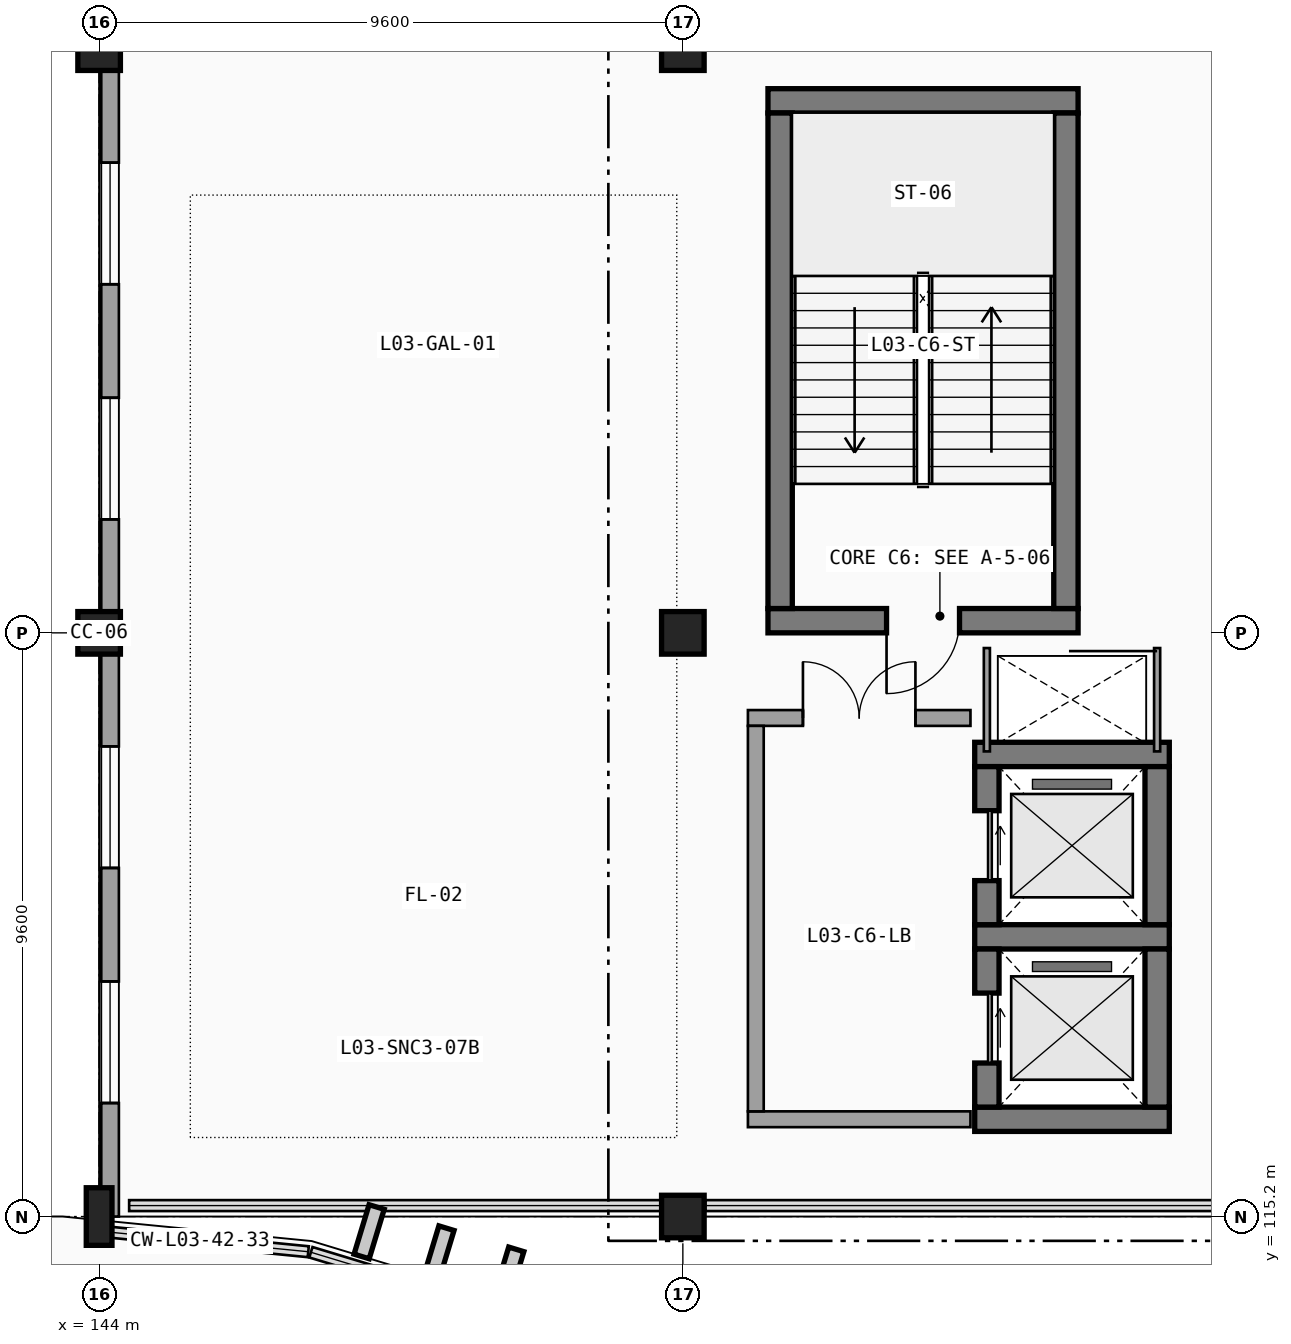
"""IFC4 building model, lengths in metres.
Left out: names, types, materials, properties, quantities, classifications, styles, units other than length and angle.
Written with IfcOpenShell. Run it as: python <this file> out.ifc"""

import sys

from ifc_helpers import new_model, si_unit, direction, frame, frame_2d, origin, origin_2d, place, context, subcontext, project, spatial, rectangle, i_section, extrude, element, fill, save


model = new_model("IFC4")
c1 = context("Model", 3, precision=1e-05, world=origin(), true_north=direction((0.0, 1.0)))
c2 = subcontext(c1, "Body", "Model", "MODEL_VIEW")
j1 = project(units=[si_unit("LENGTHUNIT", "METRE"), si_unit("PLANEANGLEUNIT", "RADIAN")], contexts=[c1])
p1 = place(None, origin())
s1 = spatial("IfcSite", under=j1, at=p1, CompositionType="ELEMENT")
p2 = place(p1, origin())
s2 = spatial("IfcBuilding", under=s1, at=p2, CompositionType="ELEMENT")
p3 = place(p2, frame((0.0, 0.0, 14.1)))
s3 = spatial("IfcBuildingStorey", under=s2, at=p3, CompositionType="ELEMENT", Elevation=14.1)
p4 = place(p3, frame((144.0, 115.2, 0.0), z_axis=(0.0, 0.0, 1.0), x_axis=(1.0, 0.0, 0.0)))
e1 = element("IfcColumn", 1, at=p4, inside=s3, PredefinedType="COLUMN", context=c2, shape_type="SweptSolid", body=[
    extrude(i_section(OverallWidth=0.423, OverallDepth=0.948, WebThickness=0.024, FlangeThickness=0.043, FilletRadius=0.024, at=origin_2d()), origin(), (0.0, 0.0, 1.0), 4.5),
])
for number, where, z_axis, x_axis in (
    (2, (144.0, 124.8, 0.0), (0.0, 0.0, 1.0), (1.0, 0.0, 0.0)),
    (3, (144.0, 134.4, 0.0), (0.0, 0.0, 1.0), (1.0, 0.0, 0.0)),
    (4, (153.6, 115.2, 0.0), (0.0, 0.0, 1.0), (1.0, 0.0, 0.0)),
    (5, (153.6, 124.8, 0.0), (0.0, 0.0, 1.0), (1.0, 0.0, 0.0)),
    (6, (153.6, 134.4, 0.0), (0.0, 0.0, 1.0), (1.0, 0.0, 0.0)),
):
    element("IfcColumn", number, at=place(p3, frame(where, z_axis=z_axis, x_axis=x_axis)), inside=s3, PredefinedType="COLUMN", context=c2, shape_type="SweptSolid", body=[
        extrude(rectangle(XDim=0.7, YDim=0.7, at=origin_2d()), origin(), (0.0, 0.0, 1.0), 4.5),
    ])
p5 = place(p3, frame((144.18, 134.4, 0.0), z_axis=(0.0, 0.0, 1.0), x_axis=(0.0, -1.0, 0.0)))
e7 = element("IfcWall", 7, at=p5, inside=s3, PredefinedType="SOLIDWALL", context=c2, shape_type="SweptSolid", body=[
    extrude(rectangle(XDim=9.6, YDim=0.29, at=frame_2d((4.8, 0.0))), origin(), (0.0, 0.0, 1.0), 3.638),
])
p6 = place(p5, frame((3.867, 0.0, 0.95), z_axis=(0.0, 0.0, 1.0), x_axis=(-1.0, 0.0, 0.0)))
e8 = element("IfcOpeningElement", 8, at=p6, cuts=e7, PredefinedType="OPENING", context=c2, shape_type="SweptSolid", body=[
    extrude(rectangle(XDim=2.0, YDim=2.0, at=frame_2d((1.0, 1.0))), frame((0.0, 0.155, 0.0), z_axis=(0.0, -1.0, 0.0), x_axis=(1.0, 0.0, 0.0)), (0.0, 0.0, 1.0), 0.31),
])
p7 = place(p5, frame((7.733, 0.0, 0.95), z_axis=(0.0, 0.0, 1.0), x_axis=(-1.0, 0.0, 0.0)))
e9 = element("IfcOpeningElement", 9, at=p7, cuts=e7, PredefinedType="OPENING", context=c2, shape_type="SweptSolid", body=[
    extrude(rectangle(XDim=2.0, YDim=2.0, at=frame_2d((1.0, 1.0))), frame((0.0, 0.155, 0.0), z_axis=(0.0, -1.0, 0.0), x_axis=(1.0, 0.0, 0.0)), (0.0, 0.0, 1.0), 0.31),
])
p8 = place(p3, frame((144.18, 124.8, 0.0), z_axis=(0.0, 0.0, 1.0), x_axis=(0.0, -1.0, 0.0)))
e10 = element("IfcWall", 10, at=p8, inside=s3, PredefinedType="SOLIDWALL", context=c2, shape_type="SweptSolid", body=[
    extrude(rectangle(XDim=9.6, YDim=0.29, at=frame_2d((4.8, 0.0))), origin(), (0.0, 0.0, 1.0), 3.313),
])
p9 = place(p8, frame((3.867, 0.0, 0.95), z_axis=(0.0, 0.0, 1.0), x_axis=(-1.0, 0.0, 0.0)))
e11 = element("IfcOpeningElement", 11, at=p9, cuts=e10, PredefinedType="OPENING", context=c2, shape_type="SweptSolid", body=[
    extrude(rectangle(XDim=2.0, YDim=2.0, at=frame_2d((1.0, 1.0))), frame((0.0, 0.155, 0.0), z_axis=(0.0, -1.0, 0.0), x_axis=(1.0, 0.0, 0.0)), (0.0, 0.0, 1.0), 0.31),
])
p10 = place(p8, frame((7.733, 0.0, 0.95), z_axis=(0.0, 0.0, 1.0), x_axis=(-1.0, 0.0, 0.0)))
e12 = element("IfcOpeningElement", 12, at=p10, cuts=e10, PredefinedType="OPENING", context=c2, shape_type="SweptSolid", body=[
    extrude(rectangle(XDim=2.0, YDim=2.0, at=frame_2d((1.0, 1.0))), frame((0.0, 0.155, 0.0), z_axis=(0.0, -1.0, 0.0), x_axis=(1.0, 0.0, 0.0)), (0.0, 0.0, 1.0), 0.31),
])
p11 = place(p3, frame((155.0, 125.0, 0.0), z_axis=(0.0, 0.0, 1.0), x_axis=(1.0, 0.0, 0.0)))
e13 = element("IfcWall", 13, at=p11, inside=s3, PredefinedType="SHEAR", context=c2, shape_type="SweptSolid", body=[
    extrude(rectangle(XDim=5.1, YDim=0.4, at=frame_2d((2.55, 0.0))), origin(), (0.0, 0.0, 1.0), 4.24),
])
p12 = place(p11, frame((3.15, 0.0, 0.0), z_axis=(0.0, 0.0, 1.0), x_axis=(-1.0, 0.0, 0.0)))
e14 = element("IfcOpeningElement", 14, at=p12, cuts=e13, PredefinedType="OPENING", context=c2, shape_type="SweptSolid", body=[
    extrude(rectangle(XDim=1.2, YDim=2.2, at=frame_2d((0.6, 1.1))), frame((0.0, 0.21, 0.0), z_axis=(0.0, -1.0, 0.0), x_axis=(1.0, 0.0, 0.0)), (0.0, 0.0, 1.0), 0.42),
])
p13 = place(p3, frame((160.1, 133.55, 0.0), z_axis=(0.0, 0.0, 1.0), x_axis=(-1.0, 0.0, 0.0)))
e15 = element("IfcWall", 15, at=p13, inside=s3, PredefinedType="SHEAR", context=c2, shape_type="SweptSolid", body=[
    extrude(rectangle(XDim=5.1, YDim=0.4, at=frame_2d((2.55, 0.0))), origin(), (0.0, 0.0, 1.0), 4.24),
])
for number, where, z_axis, x_axis in (
    (16, (155.2, 133.35, 0.0), (0.0, 0.0, 1.0), (0.0, -1.0, 0.0)),
    (17, (159.9, 125.2, 0.0), (0.0, 0.0, 1.0), (0.0, 1.0, 0.0)),
):
    element("IfcWall", number, at=place(p3, frame(where, z_axis=z_axis, x_axis=x_axis)), inside=s3, PredefinedType="SHEAR", context=c2, shape_type="SweptSolid", body=[
        extrude(rectangle(XDim=8.15, YDim=0.4, at=frame_2d((4.075, 0.0))), origin(), (0.0, 0.0, 1.0), 4.24),
    ])
for number, where, z_axis, x_axis in (
    (18, (158.4, 116.8, 0.0), (0.0, 0.0, 1.0), (1.0, 0.0, 0.0)),
    (19, (161.6, 119.8, 0.0), (0.0, 0.0, 1.0), (-1.0, 0.0, 0.0)),
):
    element("IfcWall", number, at=place(p3, frame(where, z_axis=z_axis, x_axis=x_axis)), inside=s3, PredefinedType="SHEAR", context=c2, shape_type="SweptSolid", body=[
        extrude(rectangle(XDim=3.2, YDim=0.4, at=frame_2d((1.6, 0.0))), origin(), (0.0, 0.0, 1.0), 4.24),
    ])
p14 = place(p3, frame((158.6, 119.6, 0.0), z_axis=(0.0, 0.0, 1.0), x_axis=(0.0, -1.0, 0.0)))
e20 = element("IfcWall", 20, at=p14, inside=s3, PredefinedType="SHEAR", context=c2, shape_type="SweptSolid", body=[
    extrude(rectangle(XDim=2.6, YDim=0.4, at=frame_2d((1.3, 0.0))), origin(), (0.0, 0.0, 1.0), 4.24),
])
p15 = place(p14, frame((0.725, 0.0, 0.0), z_axis=(0.0, 0.0, 1.0), x_axis=(1.0, 0.0, 0.0)))
e21 = element("IfcOpeningElement", 21, at=p15, cuts=e20, PredefinedType="OPENING", context=c2, shape_type="SweptSolid", body=[
    extrude(rectangle(XDim=1.15, YDim=2.2, at=frame_2d((0.575, 1.1))), frame((0.0, 0.21, 0.0), z_axis=(0.0, -1.0, 0.0), x_axis=(1.0, 0.0, 0.0)), (0.0, 0.0, 1.0), 0.42),
])
p16 = place(p3, frame((161.4, 117.0, 0.0), z_axis=(0.0, 0.0, 1.0), x_axis=(0.0, 1.0, 0.0)))
e22 = element("IfcWall", 22, at=p16, inside=s3, PredefinedType="SHEAR", context=c2, shape_type="SweptSolid", body=[
    extrude(rectangle(XDim=2.6, YDim=0.4, at=frame_2d((1.3, 0.0))), origin(), (0.0, 0.0, 1.0), 4.24),
])
p17 = place(p3, frame((161.6, 122.8, 0.0), z_axis=(0.0, 0.0, 1.0), x_axis=(-1.0, 0.0, 0.0)))
e23 = element("IfcWall", 23, at=p17, inside=s3, PredefinedType="SHEAR", context=c2, shape_type="SweptSolid", body=[
    extrude(rectangle(XDim=3.2, YDim=0.4, at=frame_2d((1.6, 0.0))), origin(), (0.0, 0.0, 1.0), 4.24),
])
p18 = place(p3, frame((158.6, 122.6, 0.0), z_axis=(0.0, 0.0, 1.0), x_axis=(0.0, -1.0, 0.0)))
e24 = element("IfcWall", 24, at=p18, inside=s3, PredefinedType="SHEAR", context=c2, shape_type="SweptSolid", body=[
    extrude(rectangle(XDim=2.6, YDim=0.4, at=frame_2d((1.3, 0.0))), origin(), (0.0, 0.0, 1.0), 4.24),
])
p19 = place(p18, frame((0.725, 0.0, 0.0), z_axis=(0.0, 0.0, 1.0), x_axis=(1.0, 0.0, 0.0)))
e25 = element("IfcOpeningElement", 25, at=p19, cuts=e24, PredefinedType="OPENING", context=c2, shape_type="SweptSolid", body=[
    extrude(rectangle(XDim=1.15, YDim=2.2, at=frame_2d((0.575, 1.1))), frame((0.0, 0.21, 0.0), z_axis=(0.0, -1.0, 0.0), x_axis=(1.0, 0.0, 0.0)), (0.0, 0.0, 1.0), 0.42),
])
p20 = place(p3, frame((161.4, 120.0, 0.0), z_axis=(0.0, 0.0, 1.0), x_axis=(0.0, 1.0, 0.0)))
e26 = element("IfcWall", 26, at=p20, inside=s3, PredefinedType="SHEAR", context=c2, shape_type="SweptSolid", body=[
    extrude(rectangle(XDim=2.6, YDim=0.4, at=frame_2d((1.3, 0.0))), origin(), (0.0, 0.0, 1.0), 4.24),
])
for number, where, z_axis, x_axis in (
    (27, (158.6, 124.55, 0.0), (0.0, 0.0, 1.0), (0.0, -1.0, 0.0)),
    (28, (161.4, 122.85, 0.0), (0.0, 0.0, 1.0), (0.0, 1.0, 0.0)),
):
    element("IfcWall", number, at=place(p3, frame(where, z_axis=z_axis, x_axis=x_axis)), inside=s3, PredefinedType="PARTITIONING", context=c2, shape_type="SweptSolid", body=[
        extrude(rectangle(XDim=1.7, YDim=0.1, at=frame_2d((0.85, 0.0))), origin(), (0.0, 0.0, 1.0), 4.24),
    ])
p21 = place(p3, frame((154.67, 116.8, 0.0), z_axis=(0.0, 0.0, 1.0), x_axis=(1.0, 0.0, 0.0)))
e29 = element("IfcWall", 29, at=p21, inside=s3, PredefinedType="SOLIDWALL", context=c2, shape_type="SweptSolid", body=[
    extrude(rectangle(XDim=3.66, YDim=0.26, at=frame_2d((1.83, 0.0))), origin(), (0.0, 0.0, 1.0), 4.24),
])
p22 = place(p3, frame((158.33, 123.4, 0.0), z_axis=(0.0, 0.0, 1.0), x_axis=(-1.0, 0.0, 0.0)))
e30 = element("IfcWall", 30, at=p22, inside=s3, PredefinedType="SOLIDWALL", context=c2, shape_type="SweptSolid", body=[
    extrude(rectangle(XDim=3.66, YDim=0.26, at=frame_2d((1.83, 0.0))), origin(), (0.0, 0.0, 1.0), 4.24),
])
p23 = place(p22, frame((2.755, 0.0, 0.0), z_axis=(0.0, 0.0, 1.0), x_axis=(-1.0, 0.0, 0.0)))
e31 = element("IfcOpeningElement", 31, at=p23, cuts=e30, PredefinedType="OPENING", context=c2, shape_type="SweptSolid", body=[
    extrude(rectangle(XDim=1.85, YDim=2.25, at=frame_2d((0.925, 1.125))), frame((0.0, 0.14, 0.0), z_axis=(0.0, -1.0, 0.0), x_axis=(1.0, 0.0, 0.0)), (0.0, 0.0, 1.0), 0.28),
])
p24 = place(p3, frame((154.8, 123.27, 0.0), z_axis=(0.0, 0.0, 1.0), x_axis=(0.0, -1.0, 0.0)))
e32 = element("IfcWall", 32, at=p24, inside=s3, PredefinedType="SOLIDWALL", context=c2, shape_type="SweptSolid", body=[
    extrude(rectangle(XDim=6.34, YDim=0.26, at=frame_2d((3.17, 0.0))), origin(), (0.0, 0.0, 1.0), 4.24),
])
p25 = place(p6, origin())
e33 = element("IfcWindow", 33, at=p25, inside=s3, PartitioningType="SINGLE_PANEL", PredefinedType="WINDOW", context=c2, shape_type="SweptSolid", body=[
    extrude(rectangle(XDim=2.0, YDim=2.0, at=frame_2d((1.0, 1.0))), frame((0.0, 0.03, 0.0), z_axis=(0.0, -1.0, 0.0), x_axis=(1.0, 0.0, 0.0)), (0.0, 0.0, 1.0), 0.06),
])
fill(e8, e33)
p26 = place(p7, origin())
e34 = element("IfcWindow", 34, at=p26, inside=s3, PartitioningType="SINGLE_PANEL", PredefinedType="WINDOW", context=c2, shape_type="SweptSolid", body=[
    extrude(rectangle(XDim=2.0, YDim=2.0, at=frame_2d((1.0, 1.0))), frame((0.0, 0.03, 0.0), z_axis=(0.0, -1.0, 0.0), x_axis=(1.0, 0.0, 0.0)), (0.0, 0.0, 1.0), 0.06),
])
fill(e9, e34)
p27 = place(p9, origin())
e35 = element("IfcWindow", 35, at=p27, inside=s3, PartitioningType="SINGLE_PANEL", PredefinedType="WINDOW", context=c2, shape_type="SweptSolid", body=[
    extrude(rectangle(XDim=2.0, YDim=2.0, at=frame_2d((1.0, 1.0))), frame((0.0, 0.03, 0.0), z_axis=(0.0, -1.0, 0.0), x_axis=(1.0, 0.0, 0.0)), (0.0, 0.0, 1.0), 0.06),
])
fill(e11, e35)
p28 = place(p10, origin())
e36 = element("IfcWindow", 36, at=p28, inside=s3, PartitioningType="SINGLE_PANEL", PredefinedType="WINDOW", context=c2, shape_type="SweptSolid", body=[
    extrude(rectangle(XDim=2.0, YDim=2.0, at=frame_2d((1.0, 1.0))), frame((0.0, 0.03, 0.0), z_axis=(0.0, -1.0, 0.0), x_axis=(1.0, 0.0, 0.0)), (0.0, 0.0, 1.0), 0.06),
])
fill(e12, e36)
p29 = place(p12, origin())
e37 = element("IfcDoor", 37, at=p29, inside=s3, OperationType="SINGLE_SWING_RIGHT", PredefinedType="DOOR", context=c2, shape_type="SweptSolid", body=[
    extrude(rectangle(XDim=1.2, YDim=2.2, at=frame_2d((0.6, 1.1))), frame((0.0, 0.025, 0.0), z_axis=(0.0, -1.0, 0.0), x_axis=(1.0, 0.0, 0.0)), (0.0, 0.0, 1.0), 0.05),
])
fill(e14, e37)
p30 = place(p15, origin())
e38 = element("IfcDoor", 38, at=p30, inside=s3, OperationType="SLIDING_TO_LEFT", PredefinedType="DOOR", context=c2, shape_type="SweptSolid", body=[
    extrude(rectangle(XDim=1.15, YDim=2.2, at=frame_2d((0.575, 1.1))), frame((0.0, 0.025, 0.0), z_axis=(0.0, -1.0, 0.0), x_axis=(1.0, 0.0, 0.0)), (0.0, 0.0, 1.0), 0.05),
])
fill(e21, e38)
p31 = place(p19, origin())
e39 = element("IfcDoor", 39, at=p31, inside=s3, OperationType="SLIDING_TO_LEFT", PredefinedType="DOOR", context=c2, shape_type="SweptSolid", body=[
    extrude(rectangle(XDim=1.15, YDim=2.2, at=frame_2d((0.575, 1.1))), frame((0.0, 0.025, 0.0), z_axis=(0.0, -1.0, 0.0), x_axis=(1.0, 0.0, 0.0)), (0.0, 0.0, 1.0), 0.05),
])
fill(e25, e39)
p32 = place(p23, origin())
e40 = element("IfcDoor", 40, at=p32, inside=s3, OperationType="DOUBLE_DOOR_SINGLE_SWING", PredefinedType="DOOR", context=c2, shape_type="SweptSolid", body=[
    extrude(rectangle(XDim=1.85, YDim=2.25, at=frame_2d((0.925, 1.125))), frame((0.0, 0.025, 0.0), z_axis=(0.0, -1.0, 0.0), x_axis=(1.0, 0.0, 0.0)), (0.0, 0.0, 1.0), 0.05),
])
fill(e31, e40)
save(model, sys.argv[1])
